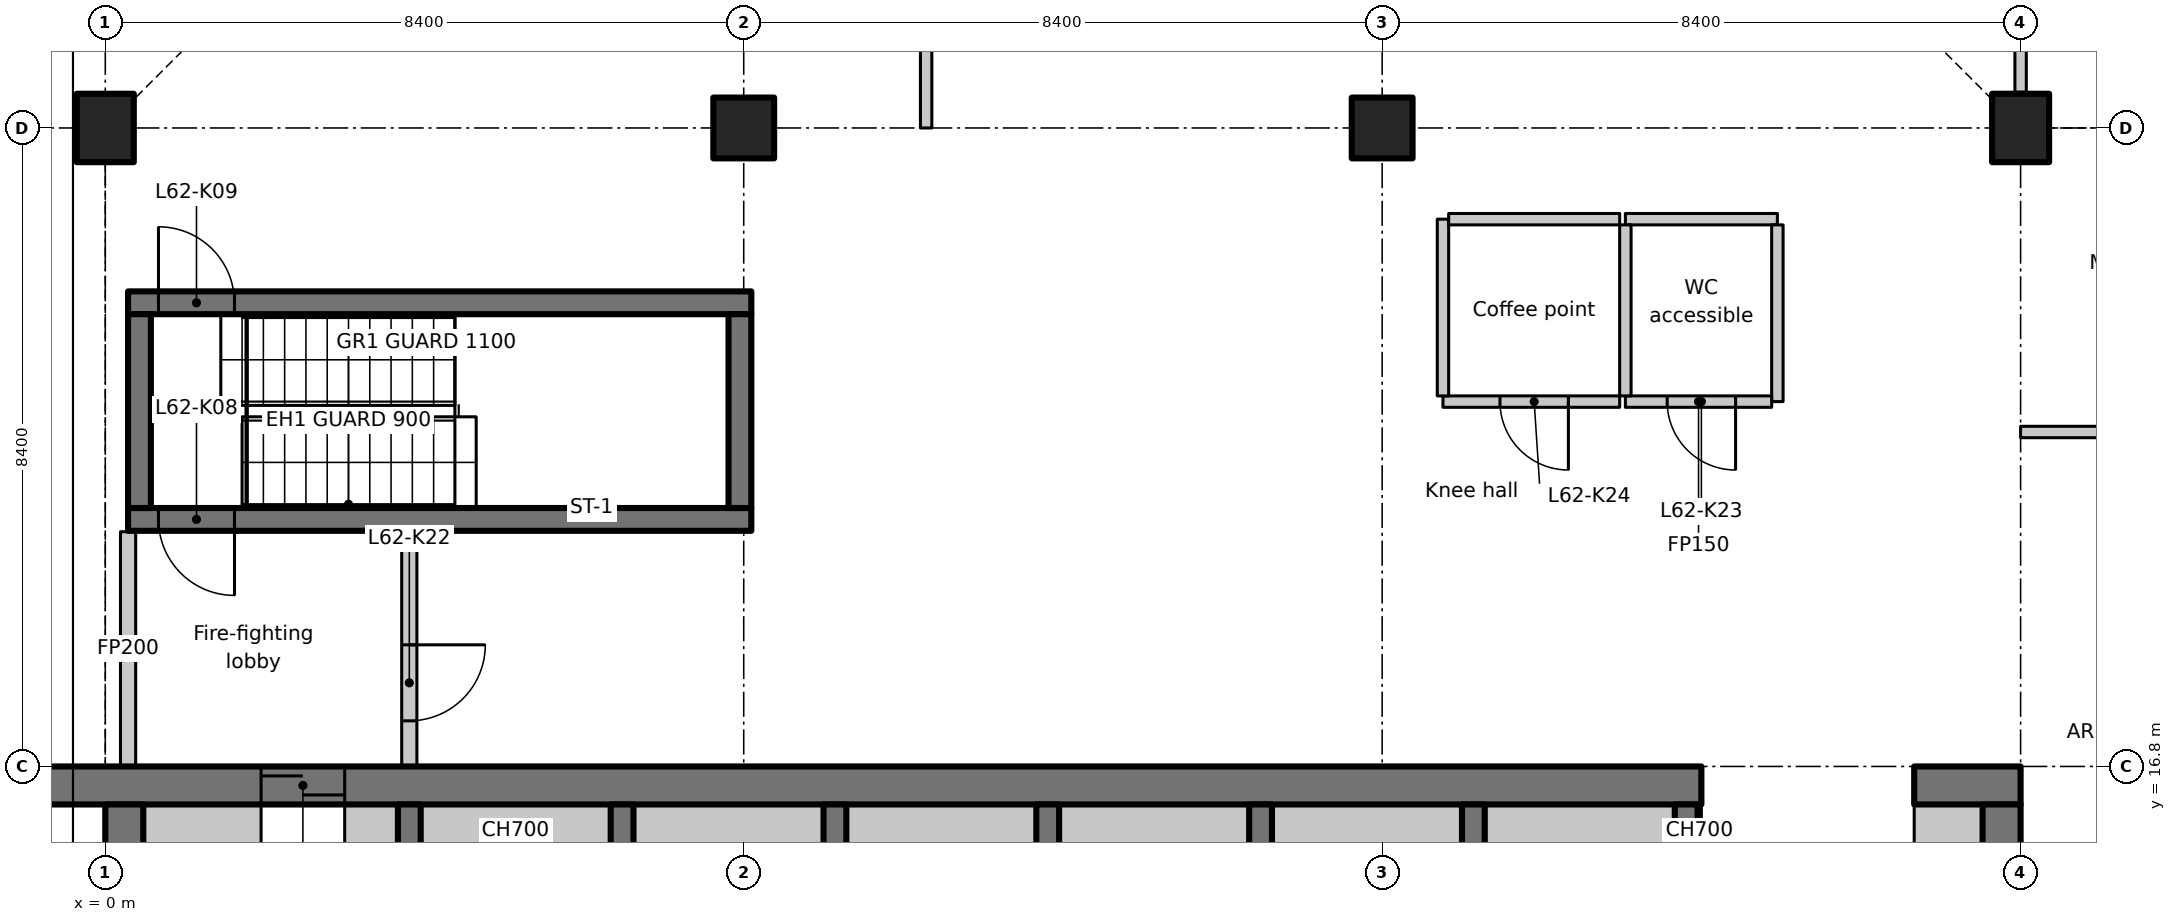
"""IFC4 building model, lengths in metres.
Left out: names, types, materials, properties, quantities, classifications, styles, units other than length and angle.
Written with IfcOpenShell. Run it as: python <this file> out.ifc"""

import sys

from ifc_helpers import new_model, si_unit, direction, frame, frame_2d, origin, origin_2d, place, context, subcontext, project, spatial, polyline, rectangle, outline, extrude, element, fill, save


model = new_model("IFC4")
c1 = context("Model", 3, precision=1e-05, world=origin(), true_north=direction((0.0, 1.0)))
c2 = subcontext(c1, "Body", "Model", "MODEL_VIEW")
j1 = project(units=[si_unit("LENGTHUNIT", "METRE"), si_unit("PLANEANGLEUNIT", "RADIAN")], contexts=[c1])
p1 = place(None, origin())
s1 = spatial("IfcSite", under=j1, at=p1, CompositionType="ELEMENT")
p2 = place(p1, origin())
s2 = spatial("IfcBuilding", under=s1, at=p2, CompositionType="ELEMENT")
p3 = place(p2, frame((0.0, 0.0, 244.5)))
s3 = spatial("IfcBuildingStorey", under=s2, at=p3, CompositionType="ELEMENT", Elevation=244.5)
p4 = place(p3, frame((0.0, 25.2, 0.0), z_axis=(0.0, 0.0, 1.0), x_axis=(1.0, 0.0, 0.0)))
e1 = element("IfcColumn", 1, at=p4, inside=s3, PredefinedType="COLUMN", context=c2, shape_type="SweptSolid", body=[
    extrude(rectangle(XDim=0.75, YDim=0.9, at=origin_2d()), origin(), (0.0, 0.0, 1.0), 3.35),
])
for number, where, z_axis, x_axis in (
    (2, (8.4, 25.2, 0.0), (0.0, 0.0, 1.0), (1.0, 0.0, 0.0)),
    (3, (16.8, 25.2, 0.0), (0.0, 0.0, 1.0), (1.0, 0.0, 0.0)),
):
    element("IfcColumn", number, at=place(p3, frame(where, z_axis=z_axis, x_axis=x_axis)), inside=s3, PredefinedType="COLUMN", context=c2, shape_type="SweptSolid", body=[
        extrude(rectangle(XDim=0.8, YDim=0.8, at=origin_2d()), origin(), (0.0, 0.0, 1.0), 3.35),
    ])
p5 = place(p3, frame((25.2, 25.2, 0.0), z_axis=(0.0, 0.0, 1.0), x_axis=(1.0, 0.0, 0.0)))
e4 = element("IfcColumn", 4, at=p5, inside=s3, PredefinedType="COLUMN", context=c2, shape_type="SweptSolid", body=[
    extrude(rectangle(XDim=0.75, YDim=0.9, at=origin_2d()), origin(), (0.0, 0.0, 1.0), 3.35),
])
p6 = place(p3, frame((-1.1, 16.55, 0.0), z_axis=(0.0, 0.0, 1.0), x_axis=(1.0, 0.0, 0.0)))
e5 = element("IfcWall", 5, at=p6, inside=s3, PredefinedType="SHEAR", context=c2, shape_type="SweptSolid", body=[
    extrude(rectangle(XDim=22.1, YDim=0.5, at=frame_2d((11.05, 0.0))), origin(), (0.0, 0.0, 1.0), 3.35),
])
p7 = place(p6, frame((3.15, 0.0, 0.0)))
e6 = element("IfcOpeningElement", 6, at=p7, cuts=e5, PredefinedType="OPENING", context=c2, shape_type="SweptSolid", body=[
    extrude(rectangle(XDim=1.1, YDim=2.3, at=frame_2d((0.55, 1.15))), frame((0.0, 0.26, 0.0), z_axis=(0.0, -1.0, 0.0), x_axis=(1.0, 0.0, 0.0)), (0.0, 0.0, 1.0), 0.52),
])
p8 = place(p3, frame((23.8, 16.55, 0.0), z_axis=(0.0, 0.0, 1.0), x_axis=(1.0, 0.0, 0.0)))
e7 = element("IfcWall", 7, at=p8, inside=s3, PredefinedType="SHEAR", context=c2, shape_type="SweptSolid", body=[
    extrude(rectangle(XDim=1.4, YDim=0.5, at=frame_2d((0.7, 0.0))), origin(), (0.0, 0.0, 1.0), 3.35),
])
p9 = place(p3, frame((0.25, 7.436, 0.0), z_axis=(0.0, 0.0, 1.0), x_axis=(0.0, 1.0, 0.0)))
e8 = element("IfcWall", 8, at=p9, inside=s3, PredefinedType="SHEAR", context=c2, shape_type="SweptSolid", body=[
    extrude(rectangle(XDim=8.864, YDim=0.5, at=frame_2d((4.432, 0.0))), origin(), (0.0, 0.0, 1.0), 3.35),
])
p10 = place(p3, frame((24.95, 12.6, 0.0), z_axis=(0.0, 0.0, 1.0), x_axis=(0.0, 1.0, 0.0)))
e9 = element("IfcWall", 9, at=p10, inside=s3, PredefinedType="SHEAR", context=c2, shape_type="SweptSolid", body=[
    extrude(rectangle(XDim=3.7, YDim=0.5, at=frame_2d((1.85, 0.0))), origin(), (0.0, 0.0, 1.0), 3.35),
])
p11 = place(p3, frame((0.5, 15.95, 0.0), z_axis=(0.0, 0.0, 1.0), x_axis=(1.0, 0.0, 0.0)))
e10 = element("IfcWall", 10, at=p11, inside=s3, PredefinedType="PARTITIONING", context=c2, shape_type="SweptSolid", body=[
    extrude(rectangle(XDim=1.55, YDim=0.7, at=frame_2d((0.775, 0.0))), origin(), (0.0, 0.0, 1.0), 3.35),
])
p12 = place(p3, frame((23.8, 15.95, 0.0), z_axis=(0.0, 0.0, 1.0), x_axis=(1.0, 0.0, 0.0)))
e11 = element("IfcWall", 11, at=p12, inside=s3, PredefinedType="PARTITIONING", context=c2, shape_type="SweptSolid", body=[
    extrude(rectangle(XDim=0.9, YDim=0.7, at=frame_2d((0.45, 0.0))), origin(), (0.0, 0.0, 1.0), 3.35),
])
for number, where, z_axis, x_axis in (
    (12, (4.0, 12.95, 0.0), (0.0, 0.0, 1.0), (0.0, 1.0, 0.0)),
    (13, (6.8, 12.95, 0.0), (0.0, 0.0, 1.0), (0.0, 1.0, 0.0)),
    (14, (9.6, 12.95, 0.0), (0.0, 0.0, 1.0), (0.0, 1.0, 0.0)),
    (15, (12.4, 12.95, 0.0), (0.0, 0.0, 1.0), (0.0, 1.0, 0.0)),
    (16, (15.2, 12.95, 0.0), (0.0, 0.0, 1.0), (0.0, 1.0, 0.0)),
    (17, (18.0, 12.95, 0.0), (0.0, 0.0, 1.0), (0.0, 1.0, 0.0)),
    (18, (20.8, 12.95, 0.0), (0.0, 0.0, 1.0), (0.0, 1.0, 0.0)),
):
    element("IfcWall", number, at=place(p3, frame(where, z_axis=z_axis, x_axis=x_axis)), inside=s3, PredefinedType="SHEAR", context=c2, shape_type="SweptSolid", body=[
        extrude(rectangle(XDim=3.35, YDim=0.3, at=frame_2d((1.675, 0.0))), origin(), (0.0, 0.0, 1.0), 3.35),
    ])
p13 = place(p3, frame((8.5, 20.05, 0.0), z_axis=(0.0, 0.0, 1.0), x_axis=(-1.0, 0.0, 0.0)))
e19 = element("IfcWall", 19, at=p13, inside=s3, PredefinedType="SHEAR", context=c2, shape_type="SweptSolid", body=[
    extrude(rectangle(XDim=8.2, YDim=0.3, at=frame_2d((4.1, 0.0))), origin(), (0.0, 0.0, 1.0), 3.35),
])
p14 = place(p13, frame((6.8, 0.0, 0.0)))
e20 = element("IfcOpeningElement", 20, at=p14, cuts=e19, PredefinedType="OPENING", context=c2, shape_type="SweptSolid", body=[
    extrude(rectangle(XDim=1.0, YDim=2.1, at=frame_2d((0.5, 1.05))), frame((0.0, 0.16, 0.0), z_axis=(0.0, -1.0, 0.0), x_axis=(1.0, 0.0, 0.0)), (0.0, 0.0, 1.0), 0.32),
])
p15 = place(p3, frame((0.3, 22.9, 0.0), z_axis=(0.0, 0.0, 1.0), x_axis=(1.0, 0.0, 0.0)))
e21 = element("IfcWall", 21, at=p15, inside=s3, PredefinedType="SHEAR", context=c2, shape_type="SweptSolid", body=[
    extrude(rectangle(XDim=8.2, YDim=0.3, at=frame_2d((4.1, 0.0))), origin(), (0.0, 0.0, 1.0), 3.35),
])
p16 = place(p15, frame((0.4, 0.0, 0.0)))
e22 = element("IfcOpeningElement", 22, at=p16, cuts=e21, PredefinedType="OPENING", context=c2, shape_type="SweptSolid", body=[
    extrude(rectangle(XDim=1.0, YDim=2.1, at=frame_2d((0.5, 1.05))), frame((0.0, 0.16, 0.0), z_axis=(0.0, -1.0, 0.0), x_axis=(1.0, 0.0, 0.0)), (0.0, 0.0, 1.0), 0.32),
])
for number, where, z_axis, x_axis in (
    (23, (0.45, 20.2, 0.0), (0.0, 0.0, 1.0), (0.0, 1.0, 0.0)),
    (24, (8.35, 20.2, 0.0), (0.0, 0.0, 1.0), (0.0, 1.0, 0.0)),
):
    element("IfcWall", number, at=place(p3, frame(where, z_axis=z_axis, x_axis=x_axis)), inside=s3, PredefinedType="SHEAR", context=c2, shape_type="SweptSolid", body=[
        extrude(rectangle(XDim=2.55, YDim=0.3, at=frame_2d((1.275, 0.0))), origin(), (0.0, 0.0, 1.0), 3.35),
    ])
p17 = place(p3, frame((0.3, 16.812, 0.0), z_axis=(0.0, 0.0, 1.0), x_axis=(0.0, 1.0, 0.0)))
e25 = element("IfcWall", 25, at=p17, inside=s3, PredefinedType="PARTITIONING", context=c2, shape_type="SweptSolid", body=[
    extrude(rectangle(XDim=3.076, YDim=0.2, at=frame_2d((1.538, 0.0))), origin(), (0.0, 0.0, 1.0), 2.98),
])
p18 = place(p3, frame((4.0, 19.888, 0.0), z_axis=(0.0, 0.0, 1.0), x_axis=(0.0, -1.0, 0.0)))
e26 = element("IfcWall", 26, at=p18, inside=s3, PredefinedType="PARTITIONING", context=c2, shape_type="SweptSolid", body=[
    extrude(rectangle(XDim=3.076, YDim=0.2, at=frame_2d((1.538, 0.0))), origin(), (0.0, 0.0, 1.0), 3.35),
])
p19 = place(p18, frame((1.488, 0.0, 0.0)))
e27 = element("IfcOpeningElement", 27, at=p19, cuts=e26, PredefinedType="OPENING", context=c2, shape_type="SweptSolid", body=[
    extrude(rectangle(XDim=1.0, YDim=2.1, at=frame_2d((0.5, 1.05))), frame((0.0, 0.11, 0.0), z_axis=(0.0, -1.0, 0.0), x_axis=(1.0, 0.0, 0.0)), (0.0, 0.0, 1.0), 0.22),
])
p20 = place(p3, frame((20.0, 24.0, 0.0), z_axis=(0.0, 0.0, 1.0), x_axis=(1.0, 0.0, 0.0)))
e28 = element("IfcWall", 28, at=p20, inside=s3, PredefinedType="PARTITIONING", context=c2, shape_type="SweptSolid", body=[
    extrude(rectangle(XDim=2.0, YDim=0.15, at=frame_2d((1.0, 0.0))), origin(), (0.0, 0.0, 1.0), 3.35),
])
p21 = place(p3, frame((22.0, 23.925, 0.0), z_axis=(0.0, 0.0, 1.0), x_axis=(0.0, -1.0, 0.0)))
e29 = element("IfcWall", 29, at=p21, inside=s3, PredefinedType="PARTITIONING", context=c2, shape_type="SweptSolid", body=[
    extrude(rectangle(XDim=2.325, YDim=0.15, at=frame_2d((1.163, 0.0))), origin(), (0.0, 0.0, 1.0), 3.35),
])
p22 = place(p3, frame((21.925, 21.6, 0.0), z_axis=(0.0, 0.0, 1.0), x_axis=(-1.0, 0.0, 0.0)))
e30 = element("IfcWall", 30, at=p22, inside=s3, PredefinedType="PARTITIONING", context=c2, shape_type="SweptSolid", body=[
    extrude(rectangle(XDim=1.925, YDim=0.15, at=frame_2d((0.962, 0.0))), origin(), (0.0, 0.0, 1.0), 3.35),
])
p23 = place(p22, frame((0.475, 0.0, 0.0)))
e31 = element("IfcOpeningElement", 31, at=p23, cuts=e30, PredefinedType="OPENING", context=c2, shape_type="SweptSolid", body=[
    extrude(rectangle(XDim=0.9, YDim=2.1, at=frame_2d((0.45, 1.05))), frame((0.0, 0.085, 0.0), z_axis=(0.0, -1.0, 0.0), x_axis=(1.0, 0.0, 0.0)), (0.0, 0.0, 1.0), 0.17),
])
p24 = place(p3, frame((20.0, 21.675, 0.0), z_axis=(0.0, 0.0, 1.0), x_axis=(0.0, 1.0, 0.0)))
e32 = element("IfcWall", 32, at=p24, inside=s3, PredefinedType="PARTITIONING", context=c2, shape_type="SweptSolid", body=[
    extrude(rectangle(XDim=2.25, YDim=0.15, at=frame_2d((1.125, 0.0))), origin(), (0.0, 0.0, 1.0), 3.35),
])
p25 = place(p3, frame((19.925, 21.6, 0.0), z_axis=(0.0, 0.0, 1.0), x_axis=(-1.0, 0.0, 0.0)))
e33 = element("IfcWall", 33, at=p25, inside=s3, PredefinedType="PARTITIONING", context=c2, shape_type="SweptSolid", body=[
    extrude(rectangle(XDim=2.325, YDim=0.15, at=frame_2d((1.163, 0.0))), origin(), (0.0, 0.0, 1.0), 3.35),
])
p26 = place(p25, frame((0.675, 0.0, 0.0)))
e34 = element("IfcOpeningElement", 34, at=p26, cuts=e33, PredefinedType="OPENING", context=c2, shape_type="SweptSolid", body=[
    extrude(rectangle(XDim=0.9, YDim=2.1, at=frame_2d((0.45, 1.05))), frame((0.0, 0.085, 0.0), z_axis=(0.0, -1.0, 0.0), x_axis=(1.0, 0.0, 0.0)), (0.0, 0.0, 1.0), 0.17),
])
p27 = place(p3, frame((17.6, 21.675, 0.0), z_axis=(0.0, 0.0, 1.0), x_axis=(0.0, 1.0, 0.0)))
e35 = element("IfcWall", 35, at=p27, inside=s3, PredefinedType="PARTITIONING", context=c2, shape_type="SweptSolid", body=[
    extrude(rectangle(XDim=2.325, YDim=0.15, at=frame_2d((1.163, 0.0))), origin(), (0.0, 0.0, 1.0), 3.35),
])
p28 = place(p3, frame((17.675, 24.0, 0.0), z_axis=(0.0, 0.0, 1.0), x_axis=(1.0, 0.0, 0.0)))
e36 = element("IfcWall", 36, at=p28, inside=s3, PredefinedType="PARTITIONING", context=c2, shape_type="SweptSolid", body=[
    extrude(rectangle(XDim=2.25, YDim=0.15, at=frame_2d((1.125, 0.0))), origin(), (0.0, 0.0, 1.0), 3.35),
])
p29 = place(p3, frame((3.15, 15.95, 0.0), z_axis=(0.0, 0.0, 1.0), x_axis=(1.0, 0.0, 0.0)))
e37 = element("IfcWall", 37, at=p29, inside=s3, PredefinedType="PARTITIONING", context=c2, shape_type="SweptSolid", body=[
    extrude(rectangle(XDim=0.7, YDim=0.7, at=frame_2d((0.35, 0.0))), origin(), (0.0, 0.0, 1.0), 3.35),
])
for number, where, z_axis, x_axis in (
    (38, (4.15, 15.95, 0.0), (0.0, 0.0, 1.0), (1.0, 0.0, 0.0)),
    (39, (6.95, 15.95, 0.0), (0.0, 0.0, 1.0), (1.0, 0.0, 0.0)),
    (40, (9.75, 15.95, 0.0), (0.0, 0.0, 1.0), (1.0, 0.0, 0.0)),
    (41, (12.55, 15.95, 0.0), (0.0, 0.0, 1.0), (1.0, 0.0, 0.0)),
    (42, (15.35, 15.95, 0.0), (0.0, 0.0, 1.0), (1.0, 0.0, 0.0)),
    (43, (18.15, 15.95, 0.0), (0.0, 0.0, 1.0), (1.0, 0.0, 0.0)),
):
    element("IfcWall", number, at=place(p3, frame(where, z_axis=z_axis, x_axis=x_axis)), inside=s3, PredefinedType="PARTITIONING", context=c2, shape_type="SweptSolid", body=[
        extrude(rectangle(XDim=2.5, YDim=0.7, at=frame_2d((1.25, 0.0))), origin(), (0.0, 0.0, 1.0), 3.35),
    ])
p30 = place(p3, frame((20.95, 15.95, 0.0), z_axis=(0.0, 0.0, 1.0), x_axis=(1.0, 0.0, 0.0)))
e44 = element("IfcWall", 44, at=p30, inside=s3, PredefinedType="PARTITIONING", context=c2, shape_type="SweptSolid", body=[
    extrude(rectangle(XDim=0.05, YDim=0.7, at=frame_2d((0.025, 0.0))), origin(), (0.0, 0.0, 1.0), 3.35),
])
p31 = place(p3, frame((25.2, 21.2, 0.0), z_axis=(0.0, 0.0, 1.0), x_axis=(1.0, 0.0, 0.0)))
e45 = element("IfcWall", 45, at=p31, inside=s3, PredefinedType="PARTITIONING", context=c2, shape_type="SweptSolid", body=[
    extrude(rectangle(XDim=4.2, YDim=0.15, at=frame_2d((2.1, 0.0))), origin(), (0.0, 0.0, 1.0), 3.33),
])
p32 = place(p31, frame((1.5, 0.0, 0.0)))
e46 = element("IfcOpeningElement", 46, at=p32, cuts=e45, PredefinedType="OPENING", context=c2, shape_type="SweptSolid", body=[
    extrude(rectangle(XDim=1.0, YDim=2.1, at=frame_2d((0.5, 1.05))), frame((0.0, 0.085, 0.0), z_axis=(0.0, -1.0, 0.0), x_axis=(1.0, 0.0, 0.0)), (0.0, 0.0, 1.0), 0.17),
])
p33 = place(p3, frame((25.2, 25.67, 0.0), z_axis=(0.0, 0.0, 1.0), x_axis=(0.0, 1.0, 0.0)))
e47 = element("IfcWall", 47, at=p33, inside=s3, PredefinedType="PARTITIONING", context=c2, shape_type="SweptSolid", body=[
    extrude(rectangle(XDim=3.93, YDim=0.15, at=frame_2d((1.965, 0.0))), origin(), (0.0, 0.0, 1.0), 2.98),
])
p34 = place(p3, frame((10.8, 25.2, 0.0), z_axis=(0.0, 0.0, 1.0), x_axis=(0.0, 1.0, 0.0)))
e48 = element("IfcWall", 48, at=p34, inside=s3, PredefinedType="PARTITIONING", context=c2, shape_type="SweptSolid", body=[
    extrude(outline(polyline([(0.0, 0.0), (8.4, 0.0), (8.4, 2.98), (7.952, 2.98), (7.95, 3.33), (0.0, 3.33), (0.0, 0.0)])), frame((0.0, 0.075, 0.0), z_axis=(0.0, -1.0, 0.0), x_axis=(1.0, 0.0, 0.0)), (0.0, 0.0, 1.0), 0.15),
])
p35 = place(p34, frame((3.3, 0.0, 0.0)))
e49 = element("IfcOpeningElement", 49, at=p35, cuts=e48, PredefinedType="OPENING", context=c2, shape_type="SweptSolid", body=[
    extrude(rectangle(XDim=1.6, YDim=2.1, at=frame_2d((0.8, 1.05))), frame((0.0, 0.085, 0.0), z_axis=(0.0, -1.0, 0.0), x_axis=(1.0, 0.0, 0.0)), (0.0, 0.0, 1.0), 0.17),
])
p36 = place(p7, origin())
e50 = element("IfcDoor", 50, at=p36, inside=s3, OperationType="SLIDING_TO_LEFT", PredefinedType="DOOR", context=c2, shape_type="SweptSolid", body=[
    extrude(rectangle(XDim=1.1, YDim=2.3, at=frame_2d((0.55, 1.15))), frame((0.0, 0.025, 0.0), z_axis=(0.0, -1.0, 0.0), x_axis=(1.0, 0.0, 0.0)), (0.0, 0.0, 1.0), 0.05),
])
fill(e6, e50)
p37 = place(p14, origin())
e51 = element("IfcDoor", 51, at=p37, inside=s3, OperationType="SINGLE_SWING_RIGHT", PredefinedType="DOOR", context=c2, shape_type="SweptSolid", body=[
    extrude(rectangle(XDim=1.0, YDim=2.1, at=frame_2d((0.5, 1.05))), frame((0.0, 0.025, 0.0), z_axis=(0.0, -1.0, 0.0), x_axis=(1.0, 0.0, 0.0)), (0.0, 0.0, 1.0), 0.05),
])
fill(e20, e51)
p38 = place(p16, origin())
e52 = element("IfcDoor", 52, at=p38, inside=s3, OperationType="SINGLE_SWING_LEFT", PredefinedType="DOOR", context=c2, shape_type="SweptSolid", body=[
    extrude(rectangle(XDim=1.0, YDim=2.1, at=frame_2d((0.5, 1.05))), frame((0.0, 0.025, 0.0), z_axis=(0.0, -1.0, 0.0), x_axis=(1.0, 0.0, 0.0)), (0.0, 0.0, 1.0), 0.05),
])
fill(e22, e52)
p39 = place(p19, origin())
e53 = element("IfcDoor", 53, at=p39, inside=s3, OperationType="SINGLE_SWING_RIGHT", PredefinedType="DOOR", context=c2, shape_type="SweptSolid", body=[
    extrude(rectangle(XDim=1.0, YDim=2.1, at=frame_2d((0.5, 1.05))), frame((0.0, 0.025, 0.0), z_axis=(0.0, -1.0, 0.0), x_axis=(1.0, 0.0, 0.0)), (0.0, 0.0, 1.0), 0.05),
])
fill(e27, e53)
p40 = place(p23, origin())
e54 = element("IfcDoor", 54, at=p40, inside=s3, OperationType="SINGLE_SWING_LEFT", PredefinedType="DOOR", context=c2, shape_type="SweptSolid", body=[
    extrude(rectangle(XDim=0.9, YDim=2.1, at=frame_2d((0.45, 1.05))), frame((0.0, 0.025, 0.0), z_axis=(0.0, -1.0, 0.0), x_axis=(1.0, 0.0, 0.0)), (0.0, 0.0, 1.0), 0.05),
])
fill(e31, e54)
p41 = place(p26, origin())
e55 = element("IfcDoor", 55, at=p41, inside=s3, OperationType="SINGLE_SWING_RIGHT", PredefinedType="DOOR", context=c2, shape_type="SweptSolid", body=[
    extrude(rectangle(XDim=0.9, YDim=2.1, at=frame_2d((0.45, 1.05))), frame((0.0, 0.025, 0.0), z_axis=(0.0, -1.0, 0.0), x_axis=(1.0, 0.0, 0.0)), (0.0, 0.0, 1.0), 0.05),
])
fill(e34, e55)
save(model, sys.argv[1])
